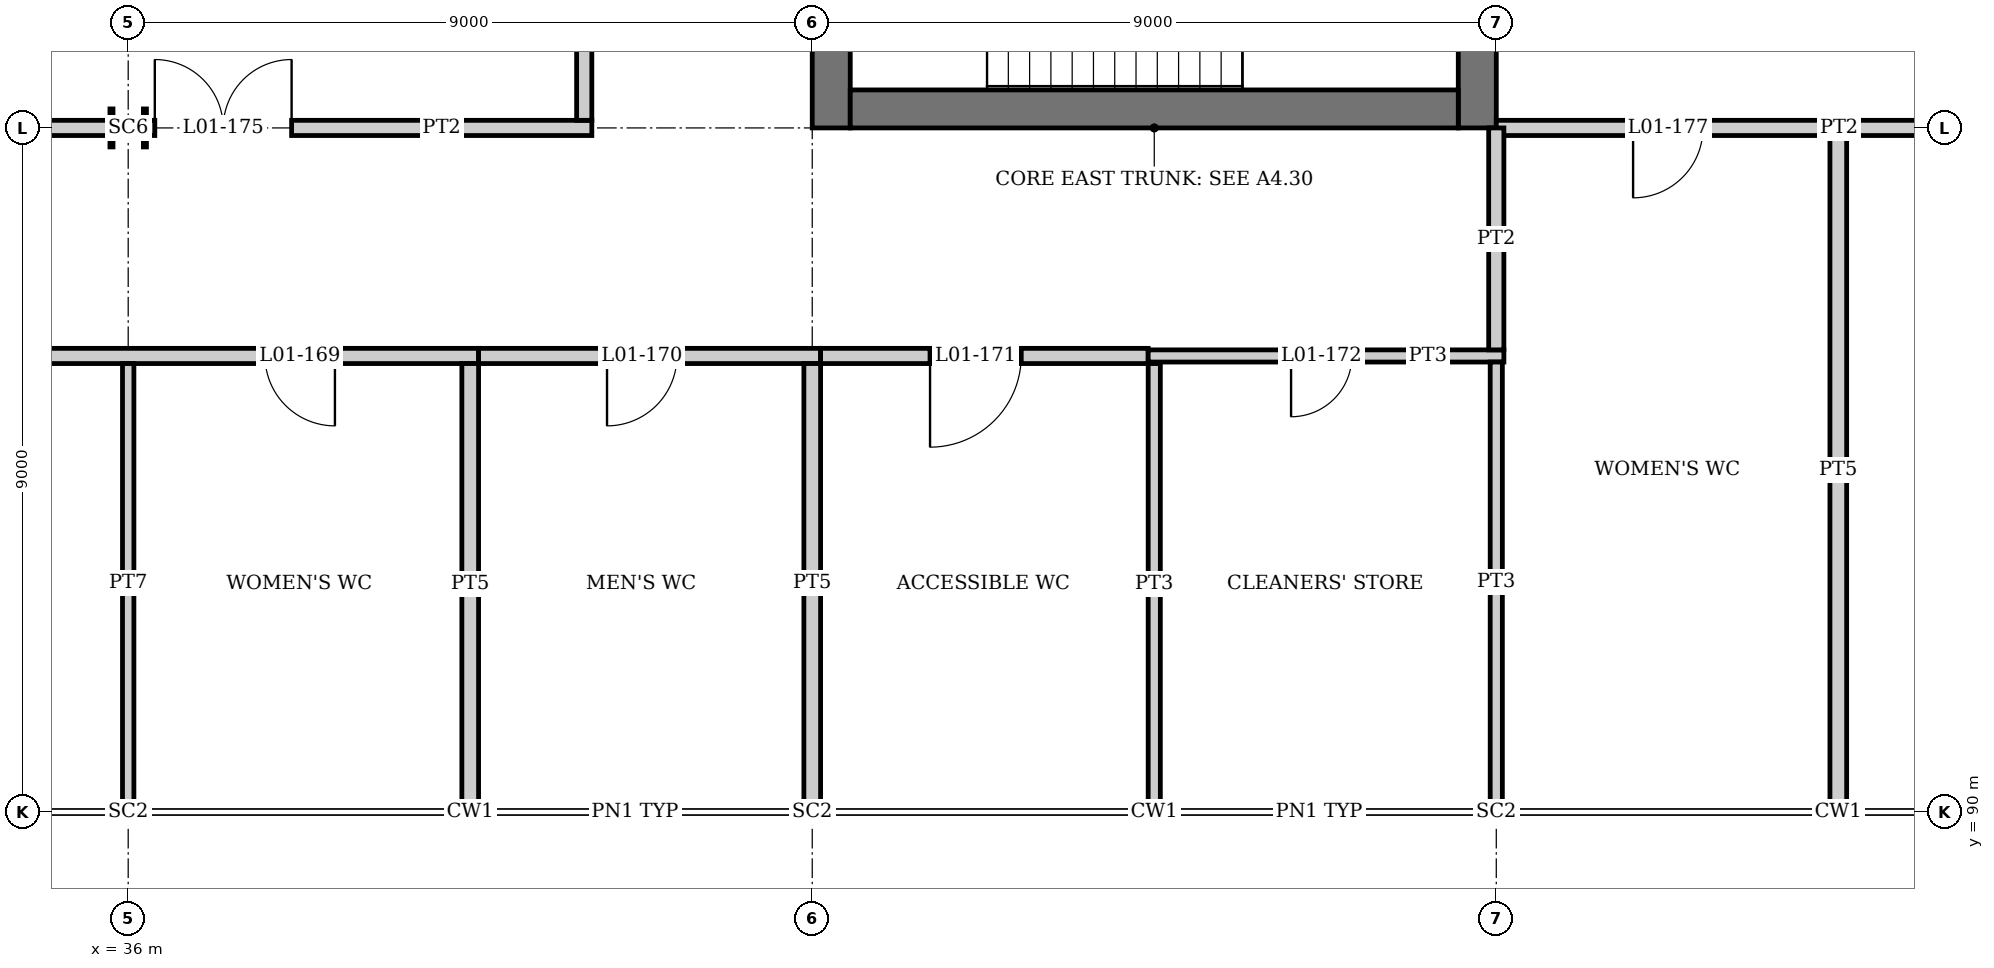
"""IFC4 building model, lengths in metres.
Left out: names, types, materials, properties, quantities, classifications, styles, units other than length and angle.
Written with IfcOpenShell. Run it as: python <this file> out.ifc"""

import sys

from ifc_helpers import new_model, si_unit, direction, frame, frame_2d, origin, origin_2d, place, context, subcontext, project, spatial, rectangle, i_section, extrude, element, fill, save


model = new_model("IFC4")
c1 = context("Model", 3, precision=1e-05, world=origin(), true_north=direction((0.0, 1.0)))
c2 = subcontext(c1, "Body", "Model", "MODEL_VIEW")
j1 = project(units=[si_unit("LENGTHUNIT", "METRE"), si_unit("PLANEANGLEUNIT", "RADIAN")], contexts=[c1])
p1 = place(None, origin())
s1 = spatial("IfcSite", under=j1, at=p1, CompositionType="ELEMENT")
p2 = place(p1, origin())
s2 = spatial("IfcBuilding", under=s1, at=p2, CompositionType="ELEMENT")
p3 = place(p2, frame((0.0, 0.0, 6.0)))
s3 = spatial("IfcBuildingStorey", under=s2, at=p3, CompositionType="ELEMENT", Elevation=6.0)
p4 = place(p3, frame((36.0, 90.0, 0.0), z_axis=(0.0, 0.0, 1.0), x_axis=(0.0, 1.0, 0.0)))
e1 = element("IfcColumn", 1, at=p4, inside=s3, PredefinedType="COLUMN", context=c2, shape_type="SweptSolid", body=[
    extrude(i_section(OverallWidth=0.256, OverallDepth=0.26, WebThickness=0.01, FlangeThickness=0.017, at=origin_2d()), origin(), (0.0, 0.0, 1.0), 4.5),
])
p5 = place(p3, frame((36.0, 99.0, 0.0), z_axis=(0.0, 0.0, 1.0), x_axis=(0.0, 1.0, 0.0)))
e2 = element("IfcColumn", 2, at=p5, inside=s3, PredefinedType="COLUMN", context=c2, shape_type="SweptSolid", body=[
    extrude(i_section(OverallWidth=0.5, OverallDepth=0.48, WebThickness=0.04, FlangeThickness=0.04, at=origin_2d()), origin(), (0.0, 0.0, 1.0), 4.5),
])
for number, where, z_axis, x_axis in (
    (3, (45.0, 90.0, 0.0), (0.0, 0.0, 1.0), (0.0, 1.0, 0.0)),
    (4, (54.0, 90.0, 0.0), (0.0, 0.0, 1.0), (0.0, 1.0, 0.0)),
):
    element("IfcColumn", number, at=place(p3, frame(where, z_axis=z_axis, x_axis=x_axis)), inside=s3, PredefinedType="COLUMN", context=c2, shape_type="SweptSolid", body=[
        extrude(i_section(OverallWidth=0.256, OverallDepth=0.26, WebThickness=0.01, FlangeThickness=0.017, at=origin_2d()), origin(), (0.0, 0.0, 1.0), 4.5),
    ])
p6 = place(p3, frame((45.25, 99.0, 0.0), z_axis=(0.0, 0.0, 1.0), x_axis=(0.0, 1.0, 0.0)))
e5 = element("IfcWall", 5, at=p6, inside=s3, PredefinedType="SHEAR", context=c2, shape_type="SweptSolid", body=[
    extrude(rectangle(XDim=18.0, YDim=0.5, at=frame_2d((9.0, 0.0))), origin(), (0.0, 0.0, 1.0), 4.5),
])
p7 = place(p6, frame((1.5, 0.0, 0.0)))
e6 = element("IfcOpeningElement", 6, at=p7, cuts=e5, PredefinedType="OPENING", context=c2, shape_type="SweptSolid", body=[
    extrude(rectangle(XDim=1.8, YDim=2.1, at=frame_2d((0.9, 1.05))), frame((0.0, 0.26, 0.0), z_axis=(0.0, -1.0, 0.0), x_axis=(1.0, 0.0, 0.0)), (0.0, 0.0, 1.0), 0.52),
])
p8 = place(p6, frame((14.7, 0.0, 0.0)))
e7 = element("IfcOpeningElement", 7, at=p8, cuts=e5, PredefinedType="OPENING", context=c2, shape_type="SweptSolid", body=[
    extrude(rectangle(XDim=1.8, YDim=2.1, at=frame_2d((0.9, 1.05))), frame((0.0, 0.26, 0.0), z_axis=(0.0, -1.0, 0.0), x_axis=(1.0, 0.0, 0.0)), (0.0, 0.0, 1.0), 0.52),
])
p9 = place(p6, frame((7.5, 0.0, 0.0)))
e8 = element("IfcOpeningElement", 8, at=p9, cuts=e5, PredefinedType="OPENING", context=c2, shape_type="SweptSolid", body=[
    extrude(rectangle(XDim=1.8, YDim=2.1, at=frame_2d((0.9, 1.05))), frame((0.0, 0.26, 0.0), z_axis=(0.0, -1.0, 0.0), x_axis=(1.0, 0.0, 0.0)), (0.0, 0.0, 1.0), 0.52),
])
p10 = place(p3, frame((53.75, 99.0, 0.0), z_axis=(0.0, 0.0, 1.0), x_axis=(0.0, 1.0, 0.0)))
e9 = element("IfcWall", 9, at=p10, inside=s3, PredefinedType="SHEAR", context=c2, shape_type="SweptSolid", body=[
    extrude(rectangle(XDim=18.0, YDim=0.5, at=frame_2d((9.0, 0.0))), origin(), (0.0, 0.0, 1.0), 4.5),
])
p11 = place(p3, frame((45.5, 99.25, 0.0), z_axis=(0.0, 0.0, 1.0), x_axis=(1.0, 0.0, 0.0)))
e10 = element("IfcWall", 10, at=p11, inside=s3, PredefinedType="SHEAR", context=c2, shape_type="SweptSolid", body=[
    extrude(rectangle(XDim=8.0, YDim=0.5, at=frame_2d((4.0, 0.0))), origin(), (0.0, 0.0, 1.0), 4.5),
])
p12 = place(p3, frame((0.15, 96.0, 0.0), z_axis=(0.0, 0.0, 1.0), x_axis=(1.0, 0.0, 0.0)))
e11 = element("IfcWall", 11, at=p12, inside=s3, PredefinedType="PARTITIONING", context=c2, shape_type="SweptSolid", body=[
    extrude(rectangle(XDim=40.46, YDim=0.2, at=frame_2d((20.23, 0.0))), origin(), (0.0, 0.0, 1.0), 3.991),
])
p13 = place(p12, frame((3.9, 0.0, 0.0)))
e12 = element("IfcOpeningElement", 12, at=p13, cuts=e11, PredefinedType="OPENING", context=c2, shape_type="SweptSolid", body=[
    extrude(rectangle(XDim=1.0, YDim=2.1, at=frame_2d((0.5, 1.05))), frame((0.0, 0.11, 0.0), z_axis=(0.0, -1.0, 0.0), x_axis=(1.0, 0.0, 0.0)), (0.0, 0.0, 1.0), 0.22),
])
p14 = place(p12, frame((12.9, 0.0, 0.0)))
e13 = element("IfcOpeningElement", 13, at=p14, cuts=e11, PredefinedType="OPENING", context=c2, shape_type="SweptSolid", body=[
    extrude(rectangle(XDim=1.0, YDim=2.1, at=frame_2d((0.5, 1.05))), frame((0.0, 0.11, 0.0), z_axis=(0.0, -1.0, 0.0), x_axis=(1.0, 0.0, 0.0)), (0.0, 0.0, 1.0), 0.22),
])
p15 = place(p12, frame((21.9, 0.0, 0.0)))
e14 = element("IfcOpeningElement", 14, at=p15, cuts=e11, PredefinedType="OPENING", context=c2, shape_type="SweptSolid", body=[
    extrude(rectangle(XDim=1.0, YDim=2.1, at=frame_2d((0.5, 1.05))), frame((0.0, 0.11, 0.0), z_axis=(0.0, -1.0, 0.0), x_axis=(1.0, 0.0, 0.0)), (0.0, 0.0, 1.0), 0.22),
])
p16 = place(p12, frame((30.9, 0.0, 0.0)))
e15 = element("IfcOpeningElement", 15, at=p16, cuts=e11, PredefinedType="OPENING", context=c2, shape_type="SweptSolid", body=[
    extrude(rectangle(XDim=1.0, YDim=2.1, at=frame_2d((0.5, 1.05))), frame((0.0, 0.11, 0.0), z_axis=(0.0, -1.0, 0.0), x_axis=(1.0, 0.0, 0.0)), (0.0, 0.0, 1.0), 0.22),
])
p17 = place(p12, frame((37.65, 0.0, 0.0)))
e16 = element("IfcOpeningElement", 16, at=p17, cuts=e11, PredefinedType="OPENING", context=c2, shape_type="SweptSolid", body=[
    extrude(rectangle(XDim=0.92, YDim=2.1, at=frame_2d((0.46, 1.05))), frame((0.0, 0.11, 0.0), z_axis=(0.0, -1.0, 0.0), x_axis=(1.0, 0.0, 0.0)), (0.0, 0.0, 1.0), 0.22),
])
p18 = place(p3, frame((40.61, 96.0, 0.0), z_axis=(0.0, 0.0, 1.0), x_axis=(1.0, 0.0, 0.0)))
e17 = element("IfcWall", 17, at=p18, inside=s3, PredefinedType="PARTITIONING", context=c2, shape_type="SweptSolid", body=[
    extrude(rectangle(XDim=4.5, YDim=0.2, at=frame_2d((2.25, 0.0))), origin(), (0.0, 0.0, 1.0), 3.994),
])
p19 = place(p18, frame((1.69, 0.0, 0.0)))
e18 = element("IfcOpeningElement", 18, at=p19, cuts=e17, PredefinedType="OPENING", context=c2, shape_type="SweptSolid", body=[
    extrude(rectangle(XDim=0.92, YDim=2.1, at=frame_2d((0.46, 1.05))), frame((0.0, 0.11, 0.0), z_axis=(0.0, -1.0, 0.0), x_axis=(1.0, 0.0, 0.0)), (0.0, 0.0, 1.0), 0.22),
])
p20 = place(p3, frame((45.11, 96.0, 0.0), z_axis=(0.0, 0.0, 1.0), x_axis=(1.0, 0.0, 0.0)))
e19 = element("IfcWall", 19, at=p20, inside=s3, PredefinedType="PARTITIONING", context=c2, shape_type="SweptSolid", body=[
    extrude(rectangle(XDim=4.31, YDim=0.2, at=frame_2d((2.155, 0.0))), origin(), (0.0, 0.0, 1.0), 3.991),
])
p21 = place(p20, frame((1.44, 0.0, 0.0)))
e20 = element("IfcOpeningElement", 20, at=p21, cuts=e19, PredefinedType="OPENING", context=c2, shape_type="SweptSolid", body=[
    extrude(rectangle(XDim=1.2, YDim=2.1, at=frame_2d((0.6, 1.05))), frame((0.0, 0.11, 0.0), z_axis=(0.0, -1.0, 0.0), x_axis=(1.0, 0.0, 0.0)), (0.0, 0.0, 1.0), 0.22),
])
p22 = place(p3, frame((49.42, 96.0, 0.0), z_axis=(0.0, 0.0, 1.0), x_axis=(1.0, 0.0, 0.0)))
e21 = element("IfcWall", 21, at=p22, inside=s3, PredefinedType="PARTITIONING", context=c2, shape_type="SweptSolid", body=[
    extrude(rectangle(XDim=4.68, YDim=0.16, at=frame_2d((2.34, 0.0))), origin(), (0.0, 0.0, 1.0), 3.991),
])
p23 = place(p22, frame((1.88, 0.0, 0.0)))
e22 = element("IfcOpeningElement", 22, at=p23, cuts=e21, PredefinedType="OPENING", context=c2, shape_type="SweptSolid", body=[
    extrude(rectangle(XDim=0.8, YDim=2.0, at=frame_2d((0.4, 1.0))), frame((0.0, 0.09, 0.0), z_axis=(0.0, -1.0, 0.0), x_axis=(1.0, 0.0, 0.0)), (0.0, 0.0, 1.0), 0.18),
])
p24 = place(p3, frame((31.7, 99.0, 0.0), z_axis=(0.0, 0.0, 1.0), x_axis=(1.0, 0.0, 0.0)))
e23 = element("IfcWall", 23, at=p24, inside=s3, PredefinedType="PARTITIONING", context=c2, shape_type="SweptSolid", body=[
    extrude(rectangle(XDim=4.05, YDim=0.2, at=frame_2d((2.025, 0.0))), origin(), (0.0, 0.0, 1.0), 3.64),
])
p25 = place(p3, frame((36.25, 99.0, 0.0), z_axis=(0.0, 0.0, 1.0), x_axis=(1.0, 0.0, 0.0)))
e24 = element("IfcWall", 24, at=p25, inside=s3, PredefinedType="PARTITIONING", context=c2, shape_type="SweptSolid", body=[
    extrude(rectangle(XDim=5.85, YDim=0.2, at=frame_2d((2.925, 0.0))), origin(), (0.0, 0.0, 1.0), 3.64),
])
p26 = place(p25, frame((0.1, 0.0, 0.0)))
e25 = element("IfcOpeningElement", 25, at=p26, cuts=e24, PredefinedType="OPENING", context=c2, shape_type="SweptSolid", body=[
    extrude(rectangle(XDim=1.8, YDim=2.1, at=frame_2d((0.9, 1.05))), frame((0.0, 0.11, 0.0), z_axis=(0.0, -1.0, 0.0), x_axis=(1.0, 0.0, 0.0)), (0.0, 0.0, 1.0), 0.22),
])
p27 = place(p3, frame((54.0, 99.0, 0.0), z_axis=(0.0, 0.0, 1.0), x_axis=(1.0, 0.0, 0.0)))
e26 = element("IfcWall", 26, at=p27, inside=s3, PredefinedType="PARTITIONING", context=c2, shape_type="SweptSolid", body=[
    extrude(rectangle(XDim=8.843, YDim=0.2, at=frame_2d((4.421, 0.0))), origin(), (0.0, 0.0, 1.0), 3.822),
])
p28 = place(p27, frame((1.8, 0.0, 0.0)))
e27 = element("IfcOpeningElement", 27, at=p28, cuts=e26, PredefinedType="OPENING", context=c2, shape_type="SweptSolid", body=[
    extrude(rectangle(XDim=0.92, YDim=2.1, at=frame_2d((0.46, 1.05))), frame((0.0, 0.11, 0.0), z_axis=(0.0, -1.0, 0.0), x_axis=(1.0, 0.0, 0.0)), (0.0, 0.0, 1.0), 0.22),
])
p29 = place(p27, frame((6.3, 0.0, 0.0)))
e28 = element("IfcOpeningElement", 28, at=p29, cuts=e26, PredefinedType="OPENING", context=c2, shape_type="SweptSolid", body=[
    extrude(rectangle(XDim=0.92, YDim=2.1, at=frame_2d((0.46, 1.05))), frame((0.0, 0.11, 0.0), z_axis=(0.0, -1.0, 0.0), x_axis=(1.0, 0.0, 0.0)), (0.0, 0.0, 1.0), 0.22),
])
p30 = place(p3, frame((36.0, 90.13, 0.0), z_axis=(0.0, 0.0, 1.0), x_axis=(0.0, 1.0, 0.0)))
e29 = element("IfcWall", 29, at=p30, inside=s3, PredefinedType="PARTITIONING", context=c2, shape_type="SweptSolid", body=[
    extrude(rectangle(XDim=5.77, YDim=0.15, at=frame_2d((2.885, 0.0))), origin(), (0.0, 0.0, 1.0), 3.991),
])
p31 = place(p3, frame((40.5, 90.1, 0.0), z_axis=(0.0, 0.0, 1.0), x_axis=(0.0, 1.0, 0.0)))
e30 = element("IfcWall", 30, at=p31, inside=s3, PredefinedType="PLUMBINGWALL", context=c2, shape_type="SweptSolid", body=[
    extrude(rectangle(XDim=5.8, YDim=0.22, at=frame_2d((2.9, 0.0))), origin(), (0.0, 0.0, 1.0), 3.998),
])
p32 = place(p3, frame((42.0, 99.1, 0.0), z_axis=(0.0, 0.0, 1.0), x_axis=(0.0, 1.0, 0.0)))
e31 = element("IfcWall", 31, at=p32, inside=s3, PredefinedType="PARTITIONING", context=c2, shape_type="SweptSolid", body=[
    extrude(rectangle(XDim=8.8, YDim=0.2, at=frame_2d((4.4, 0.0))), origin(), (0.0, 0.0, 1.0), 3.64),
])
p33 = place(p3, frame((45.0, 90.13, 0.0), z_axis=(0.0, 0.0, 1.0), x_axis=(0.0, 1.0, 0.0)))
e32 = element("IfcWall", 32, at=p33, inside=s3, PredefinedType="PLUMBINGWALL", context=c2, shape_type="SweptSolid", body=[
    extrude(rectangle(XDim=5.77, YDim=0.22, at=frame_2d((2.885, 0.0))), origin(), (0.0, 0.0, 1.0), 3.994),
])
p34 = place(p3, frame((49.5, 90.1, 0.0), z_axis=(0.0, 0.0, 1.0), x_axis=(0.0, 1.0, 0.0)))
e33 = element("IfcWall", 33, at=p34, inside=s3, PredefinedType="PARTITIONING", context=c2, shape_type="SweptSolid", body=[
    extrude(rectangle(XDim=5.8, YDim=0.16, at=frame_2d((2.9, 0.0))), origin(), (0.0, 0.0, 1.0), 3.991),
])
p35 = place(p3, frame((54.0, 90.13, 0.0), z_axis=(0.0, 0.0, 1.0), x_axis=(0.0, 1.0, 0.0)))
e34 = element("IfcWall", 34, at=p35, inside=s3, PredefinedType="PARTITIONING", context=c2, shape_type="SweptSolid", body=[
    extrude(rectangle(XDim=5.79, YDim=0.16, at=frame_2d((2.895, 0.0))), origin(), (0.0, 0.0, 1.0), 3.994),
])
p36 = place(p3, frame((54.0, 96.08, 0.0), z_axis=(0.0, 0.0, 1.0), x_axis=(0.0, 1.0, 0.0)))
e35 = element("IfcWall", 35, at=p36, inside=s3, PredefinedType="PARTITIONING", context=c2, shape_type="SweptSolid", body=[
    extrude(rectangle(XDim=2.92, YDim=0.2, at=frame_2d((1.46, 0.0))), origin(), (0.0, 0.0, 1.0), 3.822),
])
p37 = place(p3, frame((58.5, 90.1, 0.0), z_axis=(0.0, 0.0, 1.0), x_axis=(0.0, 1.0, 0.0)))
e36 = element("IfcWall", 36, at=p37, inside=s3, PredefinedType="PLUMBINGWALL", context=c2, shape_type="SweptSolid", body=[
    extrude(rectangle(XDim=8.8, YDim=0.22, at=frame_2d((4.4, 0.0))), origin(), (0.0, 0.0, 1.0), 3.822),
])
p38 = place(p17, frame((0.92, 0.0, 0.0), z_axis=(0.0, 0.0, 1.0), x_axis=(-1.0, 0.0, 0.0)))
e37 = element("IfcDoor", 37, at=p38, inside=s3, OperationType="SINGLE_SWING_LEFT", PredefinedType="DOOR", context=c2, shape_type="SweptSolid", body=[
    extrude(rectangle(XDim=0.92, YDim=2.1, at=frame_2d((0.46, 1.05))), frame((0.0, 0.025, 0.0), z_axis=(0.0, -1.0, 0.0), x_axis=(1.0, 0.0, 0.0)), (0.0, 0.0, 1.0), 0.05),
])
fill(e16, e37)
p39 = place(p19, frame((0.92, 0.0, 0.0), z_axis=(0.0, 0.0, 1.0), x_axis=(-1.0, 0.0, 0.0)))
e38 = element("IfcDoor", 38, at=p39, inside=s3, OperationType="SINGLE_SWING_RIGHT", PredefinedType="DOOR", context=c2, shape_type="SweptSolid", body=[
    extrude(rectangle(XDim=0.92, YDim=2.1, at=frame_2d((0.46, 1.05))), frame((0.0, 0.025, 0.0), z_axis=(0.0, -1.0, 0.0), x_axis=(1.0, 0.0, 0.0)), (0.0, 0.0, 1.0), 0.05),
])
fill(e18, e38)
p40 = place(p21, frame((1.2, 0.0, 0.0), z_axis=(0.0, 0.0, 1.0), x_axis=(-1.0, 0.0, 0.0)))
e39 = element("IfcDoor", 39, at=p40, inside=s3, OperationType="SINGLE_SWING_RIGHT", PredefinedType="DOOR", context=c2, shape_type="SweptSolid", body=[
    extrude(rectangle(XDim=1.2, YDim=2.1, at=frame_2d((0.6, 1.05))), frame((0.0, 0.025, 0.0), z_axis=(0.0, -1.0, 0.0), x_axis=(1.0, 0.0, 0.0)), (0.0, 0.0, 1.0), 0.05),
])
fill(e20, e39)
p41 = place(p23, frame((0.8, 0.0, 0.0), z_axis=(0.0, 0.0, 1.0), x_axis=(-1.0, 0.0, 0.0)))
e40 = element("IfcDoor", 40, at=p41, inside=s3, OperationType="SINGLE_SWING_RIGHT", PredefinedType="DOOR", context=c2, shape_type="SweptSolid", body=[
    extrude(rectangle(XDim=0.8, YDim=2.0, at=frame_2d((0.4, 1.0))), frame((0.0, 0.025, 0.0), z_axis=(0.0, -1.0, 0.0), x_axis=(1.0, 0.0, 0.0)), (0.0, 0.0, 1.0), 0.05),
])
fill(e22, e40)
p42 = place(p26, origin())
e41 = element("IfcDoor", 41, at=p42, inside=s3, OperationType="DOUBLE_DOOR_SINGLE_SWING", PredefinedType="DOOR", context=c2, shape_type="SweptSolid", body=[
    extrude(rectangle(XDim=1.8, YDim=2.1, at=frame_2d((0.9, 1.05))), frame((0.0, 0.025, 0.0), z_axis=(0.0, -1.0, 0.0), x_axis=(1.0, 0.0, 0.0)), (0.0, 0.0, 1.0), 0.05),
])
fill(e25, e41)
p43 = place(p28, frame((0.92, 0.0, 0.0), z_axis=(0.0, 0.0, 1.0), x_axis=(-1.0, 0.0, 0.0)))
e42 = element("IfcDoor", 42, at=p43, inside=s3, OperationType="SINGLE_SWING_RIGHT", PredefinedType="DOOR", context=c2, shape_type="SweptSolid", body=[
    extrude(rectangle(XDim=0.92, YDim=2.1, at=frame_2d((0.46, 1.05))), frame((0.0, 0.025, 0.0), z_axis=(0.0, -1.0, 0.0), x_axis=(1.0, 0.0, 0.0)), (0.0, 0.0, 1.0), 0.05),
])
fill(e27, e42)
save(model, sys.argv[1])
